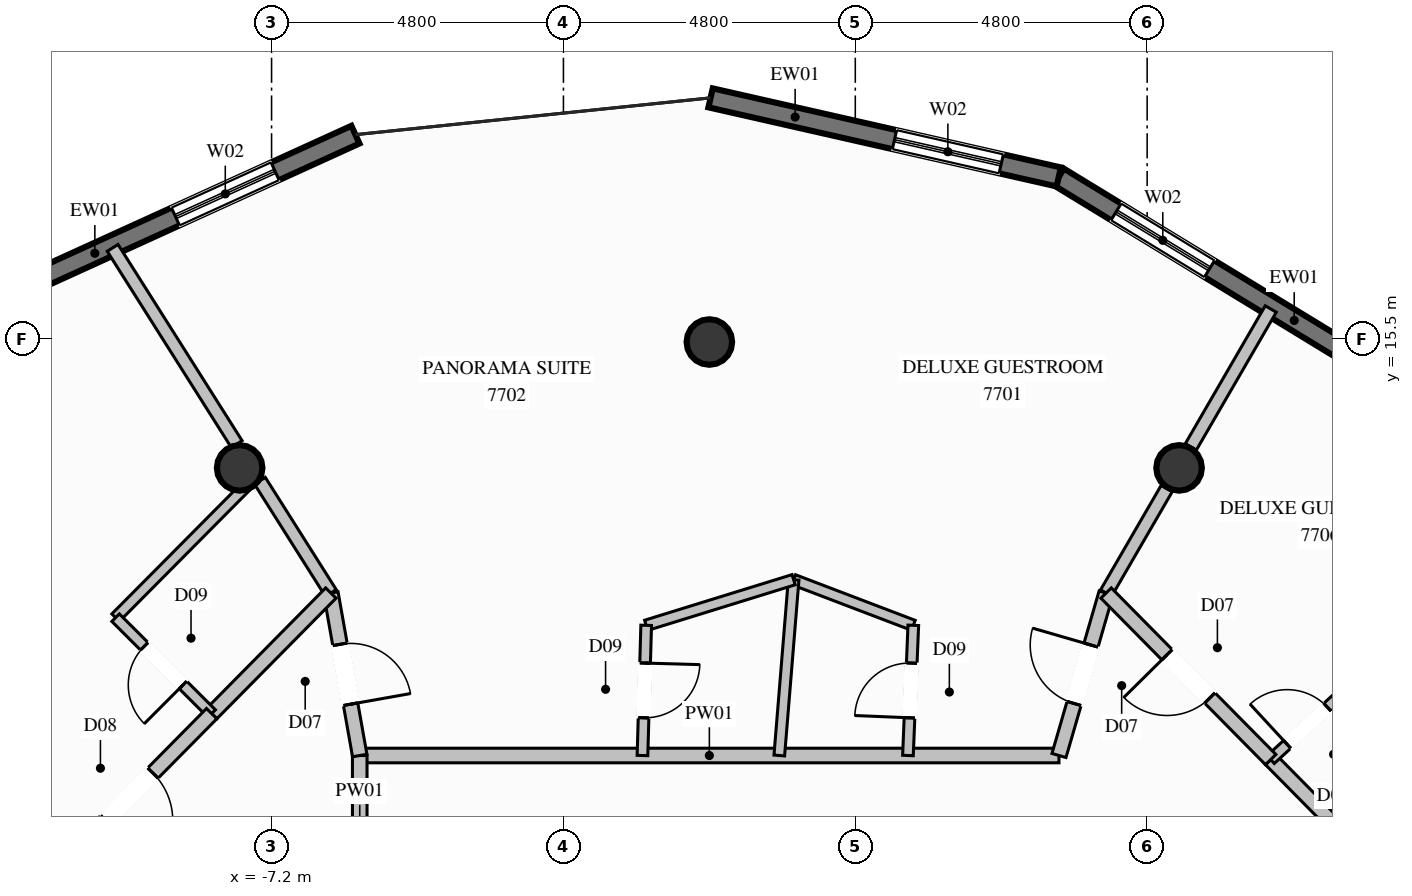
"""IFC4 building model, lengths in metres.
Left out: names, types, materials, properties, quantities, classifications, styles, units other than length and angle.
Written with IfcOpenShell. Run it as: python <this file> out.ifc"""

import sys

from ifc_helpers import new_model, si_unit, direction, frame, frame_2d, origin, origin_2d, place, context, subcontext, project, spatial, rectangle, circle, extrude, element, fill, save


model = new_model("IFC4")
c1 = context("Model", 3, precision=1e-05, world=origin(), true_north=direction((0.0, 1.0)))
c2 = subcontext(c1, "Body", "Model", "MODEL_VIEW")
j1 = project(units=[si_unit("LENGTHUNIT", "METRE"), si_unit("PLANEANGLEUNIT", "RADIAN")], contexts=[c1])
p1 = place(None, origin())
s1 = spatial("IfcSite", under=j1, at=p1, CompositionType="ELEMENT")
p2 = place(p1, origin())
s2 = spatial("IfcBuilding", under=s1, at=p2, CompositionType="ELEMENT")
p3 = place(p2, frame((0.0, 0.0, 289.6)))
s3 = spatial("IfcBuildingStorey", under=s2, at=p3, CompositionType="ELEMENT", Elevation=289.6)
for number, where, z_axis, x_axis in (
    (1, (7.725, 13.38, 0.0), (0.0, 0.0, 1.0), (1.0, 0.0, 0.0)),
    (2, (0.0, 15.45, 0.0), (0.0, 0.0, 1.0), (1.0, 0.0, 0.0)),
    (3, (-7.725, 13.38, 0.0), (0.0, 0.0, 1.0), (1.0, 0.0, 0.0)),
):
    element("IfcColumn", number, at=place(p3, frame(where, z_axis=z_axis, x_axis=x_axis)), inside=s3, PredefinedType="COLUMN", context=c2, shape_type="SweptSolid", body=[
        extrude(circle(Radius=0.375, at=origin_2d()), origin(), (0.0, 0.0, 1.0), 3.8),
    ])
p4 = place(p3, frame((5.746, 18.165, 0.0), z_axis=(0.0, 0.0, 1.0), x_axis=(0.853900395315, -0.520436465748, 0.0)))
e4 = element("IfcWall", 4, at=p4, inside=s3, PredefinedType="SOLIDWALL", context=c2, shape_type="SweptSolid", body=[
    extrude(rectangle(XDim=5.917, YDim=0.32, at=frame_2d((2.958, 0.0))), origin(), (0.0, 0.0, 1.0), 3.57),
])
p5 = place(p4, frame((1.104, 0.0, 0.35)))
e5 = element("IfcOpeningElement", 5, at=p5, cuts=e4, PredefinedType="OPENING", context=c2, shape_type="SweptSolid", body=[
    extrude(rectangle(XDim=1.8, YDim=2.6, at=frame_2d((0.9, 1.3))), frame((0.0, 0.17, 0.0), z_axis=(0.0, -1.0, 0.0), x_axis=(1.0, 0.0, 0.0)), (0.0, 0.0, 1.0), 0.34),
])
p6 = place(p3, frame((0.02, 19.465, 0.0), z_axis=(0.0, 0.0, 1.0), x_axis=(0.975181843915, -0.221405445504, 0.0)))
e6 = element("IfcWall", 6, at=p6, inside=s3, PredefinedType="SOLIDWALL", context=c2, shape_type="SweptSolid", body=[
    extrude(rectangle(XDim=5.872, YDim=0.32, at=frame_2d((2.936, 0.0))), origin(), (0.0, 0.0, 1.0), 3.57),
])
p7 = place(p6, frame((3.102, 0.0, 0.35)))
e7 = element("IfcOpeningElement", 7, at=p7, cuts=e6, PredefinedType="OPENING", context=c2, shape_type="SweptSolid", body=[
    extrude(rectangle(XDim=1.8, YDim=2.6, at=frame_2d((0.9, 1.3))), frame((0.0, 0.17, 0.0), z_axis=(0.0, -1.0, 0.0), x_axis=(1.0, 0.0, 0.0)), (0.0, 0.0, 1.0), 0.34),
])
p8 = place(p3, frame((-11.205, 16.409, 0.0), z_axis=(0.0, 0.0, 1.0), x_axis=(0.910118979779, 0.414347007526, 0.0)))
e8 = element("IfcWall", 8, at=p8, inside=s3, PredefinedType="SOLIDWALL", context=c2, shape_type="SweptSolid", body=[
    extrude(rectangle(XDim=5.916, YDim=0.32, at=frame_2d((2.958, 0.0))), origin(), (0.0, 0.0, 1.0), 3.57),
])
p9 = place(p8, frame((2.664, 0.0, 0.35)))
e9 = element("IfcOpeningElement", 9, at=p9, cuts=e8, PredefinedType="OPENING", context=c2, shape_type="SweptSolid", body=[
    extrude(rectangle(XDim=1.8, YDim=2.6, at=frame_2d((0.9, 1.3))), frame((0.0, 0.17, 0.0), z_axis=(0.0, -1.0, 0.0), x_axis=(1.0, 0.0, 0.0)), (0.0, 0.0, 1.0), 0.34),
])
p10 = place(p3, frame((-5.75, 8.65, 0.0), z_axis=(0.0, 0.0, 1.0), x_axis=(1.0, 0.0, 0.0)))
e10 = element("IfcWall", 10, at=p10, inside=s3, PredefinedType="PARTITIONING", context=c2, shape_type="SweptSolid", body=[
    extrude(rectangle(XDim=11.5, YDim=0.24, at=frame_2d((5.75, 0.0))), origin(), (0.0, 0.0, 1.0), 3.57),
])
p11 = place(p3, frame((-5.75, 6.1, 0.0), z_axis=(0.0, 0.0, 1.0), x_axis=(0.0, 1.0, 0.0)))
e11 = element("IfcWall", 11, at=p11, inside=s3, PredefinedType="PARTITIONING", context=c2, shape_type="SweptSolid", body=[
    extrude(rectangle(XDim=2.55, YDim=0.24, at=frame_2d((1.275, 0.0))), origin(), (0.0, 0.0, 1.0), 3.57),
])
p12 = place(p3, frame((6.525, 11.322, 0.0), z_axis=(0.0, 0.0, 1.0), x_axis=(0.501738314133, 0.865019458817, 0.0)))
e12 = element("IfcWall", 12, at=p12, inside=s3, PredefinedType="PARTITIONING", context=c2, shape_type="SweptSolid", body=[
    extrude(rectangle(XDim=1.987, YDim=0.21, at=frame_2d((0.994, 0.0))), origin(), (0.0, 0.0, 1.0), 3.085),
])
p13 = place(p3, frame((7.918, 13.725, 0.0), z_axis=(0.0, 0.0, 1.0), x_axis=(0.501605190626, 0.865096660921, 0.0)))
e13 = element("IfcWall", 13, at=p13, inside=s3, PredefinedType="PARTITIONING", context=c2, shape_type="SweptSolid", body=[
    extrude(rectangle(XDim=2.622, YDim=0.21, at=frame_2d((1.311, 0.0))), origin(), (0.0, 0.0, 1.0), 3.57),
])
p14 = place(p3, frame((-6.225, 11.322, 0.0), z_axis=(0.0, 0.0, 1.0), x_axis=(-0.534363069493, 0.845255056159, 0.0)))
e14 = element("IfcWall", 14, at=p14, inside=s3, PredefinedType="PARTITIONING", context=c2, shape_type="SweptSolid", body=[
    extrude(rectangle(XDim=2.184, YDim=0.21, at=frame_2d((1.092, 0.0))), origin(), (0.0, 0.0, 1.0), 3.085),
])
p15 = place(p3, frame((-7.774, 13.772, 0.0), z_axis=(0.0, 0.0, 1.0), x_axis=(-0.534464578877, 0.845190874256, 0.0)))
e15 = element("IfcWall", 15, at=p15, inside=s3, PredefinedType="PARTITIONING", context=c2, shape_type="SweptSolid", body=[
    extrude(rectangle(XDim=3.817, YDim=0.21, at=frame_2d((1.908, 0.0))), origin(), (0.0, 0.0, 1.0), 3.57),
])
p16 = place(p3, frame((1.386, 11.541, 0.0), z_axis=(0.0, 0.0, 1.0), x_axis=(0.934443654622, -0.356111016871, 0.0)))
e16 = element("IfcWall", 16, at=p16, inside=s3, PredefinedType="PLUMBINGWALL", context=c2, shape_type="SweptSolid", body=[
    extrude(rectangle(XDim=2.106, YDim=0.175, at=frame_2d((1.053, 0.0))), origin(), (0.0, 0.0, 1.0), 3.253),
])
p17 = place(p3, frame((1.386, 11.541, 0.0), z_axis=(0.0, 0.0, 1.0), x_axis=(-0.081387603682, -0.996682526167, 0.0)))
e17 = element("IfcWall", 17, at=p17, inside=s3, PredefinedType="PLUMBINGWALL", context=c2, shape_type="SweptSolid", body=[
    extrude(rectangle(XDim=2.901, YDim=0.175, at=frame_2d((1.45, 0.0))), origin(), (0.0, 0.0, 1.0), 3.57),
])
p18 = place(p3, frame((3.266, 8.65, 0.0), z_axis=(0.0, 0.0, 1.0), x_axis=(0.041014490153, 0.999158551781, 0.0)))
e18 = element("IfcWall", 18, at=p18, inside=s3, PredefinedType="PLUMBINGWALL", context=c2, shape_type="SweptSolid", body=[
    extrude(rectangle(XDim=2.143, YDim=0.175, at=frame_2d((1.071, 0.0))), origin(), (0.0, 0.0, 1.0), 3.57),
])
p19 = place(p18, frame((0.621, 0.0, 0.0)))
e19 = element("IfcOpeningElement", 19, at=p19, cuts=e18, PredefinedType="OPENING", context=c2, shape_type="SweptSolid", body=[
    extrude(rectangle(XDim=0.9, YDim=2.1, at=frame_2d((0.45, 1.05))), frame((0.0, 0.098, 0.0), z_axis=(0.0, -1.0, 0.0), x_axis=(1.0, 0.0, 0.0)), (0.0, 0.0, 1.0), 0.195),
])
p20 = place(p3, frame((5.75, 8.65, 0.0), z_axis=(0.0, 0.0, 1.0), x_axis=(0.27852040308, 0.960430312448, 0.0)))
e20 = element("IfcWall", 20, at=p20, inside=s3, PredefinedType="PARTITIONING", context=c2, shape_type="SweptSolid", body=[
    extrude(rectangle(XDim=2.782, YDim=0.24, at=frame_2d((1.391, 0.0))), origin(), (0.0, 0.0, 1.0), 3.57),
])
p21 = place(p20, frame((0.891, 0.0, 0.0)))
e21 = element("IfcOpeningElement", 21, at=p21, cuts=e20, PredefinedType="OPENING", context=c2, shape_type="SweptSolid", body=[
    extrude(rectangle(XDim=1.0, YDim=2.2, at=frame_2d((0.5, 1.1))), frame((0.0, 0.13, 0.0), z_axis=(0.0, -1.0, 0.0), x_axis=(1.0, 0.0, 0.0)), (0.0, 0.0, 1.0), 0.26),
])
p22 = place(p3, frame((-1.039, 10.791, 0.0), z_axis=(0.0, 0.0, 1.0), x_axis=(0.955353783444, 0.295464293037, 0.0)))
e22 = element("IfcWall", 22, at=p22, inside=s3, PredefinedType="PLUMBINGWALL", context=c2, shape_type="SweptSolid", body=[
    extrude(rectangle(XDim=2.538, YDim=0.175, at=frame_2d((1.269, 0.0))), origin(), (0.0, 0.0, 1.0), 3.253),
])
p23 = place(p3, frame((-1.039, 10.791, 0.0), z_axis=(0.0, 0.0, 1.0), x_axis=(-0.028494696229, -0.999593943703, 0.0)))
e23 = element("IfcWall", 23, at=p23, inside=s3, PredefinedType="PLUMBINGWALL", context=c2, shape_type="SweptSolid", body=[
    extrude(rectangle(XDim=2.142, YDim=0.175, at=frame_2d((1.071, 0.0))), origin(), (0.0, 0.0, 1.0), 3.57),
])
p24 = place(p23, frame((0.621, 0.0, 0.0)))
e24 = element("IfcOpeningElement", 24, at=p24, cuts=e23, PredefinedType="OPENING", context=c2, shape_type="SweptSolid", body=[
    extrude(rectangle(XDim=0.9, YDim=2.1, at=frame_2d((0.45, 1.05))), frame((0.0, 0.098, 0.0), z_axis=(0.0, -1.0, 0.0), x_axis=(1.0, 0.0, 0.0)), (0.0, 0.0, 1.0), 0.195),
])
p25 = place(p3, frame((-6.225, 11.322, 0.0), z_axis=(0.0, 0.0, 1.0), x_axis=(0.175052712288, -0.984559062688, 0.0)))
e25 = element("IfcWall", 25, at=p25, inside=s3, PredefinedType="PARTITIONING", context=c2, shape_type="SweptSolid", body=[
    extrude(rectangle(XDim=2.714, YDim=0.24, at=frame_2d((1.357, 0.0))), origin(), (0.0, 0.0, 1.0), 3.57),
])
p26 = place(p25, frame((0.857, 0.0, 0.0)))
e26 = element("IfcOpeningElement", 26, at=p26, cuts=e25, PredefinedType="OPENING", context=c2, shape_type="SweptSolid", body=[
    extrude(rectangle(XDim=1.0, YDim=2.2, at=frame_2d((0.5, 1.1))), frame((0.0, 0.13, 0.0), z_axis=(0.0, -1.0, 0.0), x_axis=(1.0, 0.0, 0.0)), (0.0, 0.0, 1.0), 0.26),
])
p27 = place(p3, frame((-6.225, 11.322, 0.0), z_axis=(0.0, 0.0, 1.0), x_axis=(-0.702979205765, -0.711210402245, 0.0)))
e27 = element("IfcWall", 27, at=p27, inside=s3, PredefinedType="PARTITIONING", context=c2, shape_type="SweptSolid", body=[
    extrude(rectangle(XDim=2.788, YDim=0.24, at=frame_2d((1.394, 0.0))), origin(), (0.0, 0.0, 1.0), 3.57),
])
p28 = place(p3, frame((-7.445, 13.252, 0.0), z_axis=(0.0, 0.0, 1.0), x_axis=(-0.704803641047, -0.709402444009, 0.0)))
e28 = element("IfcWall", 28, at=p28, inside=s3, PredefinedType="PLUMBINGWALL", context=c2, shape_type="SweptSolid", body=[
    extrude(rectangle(XDim=3.292, YDim=0.175, at=frame_2d((1.646, 0.0))), origin(), (0.0, 0.0, 1.0), 3.138),
])
p29 = place(p3, frame((-8.185, 9.339, 0.0), z_axis=(0.0, 0.0, 1.0), x_axis=(-0.707544008936, 0.706669282917, 0.0)))
e29 = element("IfcWall", 29, at=p29, inside=s3, PredefinedType="PLUMBINGWALL", context=c2, shape_type="SweptSolid", body=[
    extrude(rectangle(XDim=2.233, YDim=0.175, at=frame_2d((1.116, 0.0))), origin(), (0.0, 0.0, 1.0), 3.57),
])
p30 = place(p29, frame((0.667, 0.0, 0.0)))
e30 = element("IfcOpeningElement", 30, at=p30, cuts=e29, PredefinedType="OPENING", context=c2, shape_type="SweptSolid", body=[
    extrude(rectangle(XDim=0.9, YDim=2.1, at=frame_2d((0.45, 1.05))), frame((0.0, 0.098, 0.0), z_axis=(0.0, -1.0, 0.0), x_axis=(1.0, 0.0, 0.0)), (0.0, 0.0, 1.0), 0.195),
])
p31 = place(p3, frame((-8.185, 9.339, 0.0), z_axis=(0.0, 0.0, 1.0), x_axis=(-0.702942107486, -0.711247069254, 0.0)))
e31 = element("IfcWall", 31, at=p31, inside=s3, PredefinedType="PARTITIONING", context=c2, shape_type="SweptSolid", body=[
    extrude(rectangle(XDim=3.851, YDim=0.24, at=frame_2d((1.926, 0.0))), origin(), (0.0, 0.0, 1.0), 3.57),
])
p32 = place(p31, frame((1.375, 0.0, 0.0)))
e32 = element("IfcOpeningElement", 32, at=p32, cuts=e31, PredefinedType="OPENING", context=c2, shape_type="SweptSolid", body=[
    extrude(rectangle(XDim=1.1, YDim=2.3, at=frame_2d((0.55, 1.15))), frame((0.0, 0.13, 0.0), z_axis=(0.0, -1.0, 0.0), x_axis=(1.0, 0.0, 0.0)), (0.0, 0.0, 1.0), 0.26),
])
p33 = place(p3, frame((11.192, 6.6, 0.0), z_axis=(0.0, 0.0, 1.0), x_axis=(-0.702979205765, 0.711210402245, 0.0)))
e33 = element("IfcWall", 33, at=p33, inside=s3, PredefinedType="PARTITIONING", context=c2, shape_type="SweptSolid", body=[
    extrude(rectangle(XDim=2.788, YDim=0.24, at=frame_2d((1.394, 0.0))), origin(), (0.0, 0.0, 1.0), 3.57),
])
p34 = place(p3, frame((9.232, 8.583, 0.0), z_axis=(0.0, 0.0, 1.0), x_axis=(0.734923403839, 0.678150123859, 0.0)))
e34 = element("IfcWall", 34, at=p34, inside=s3, PredefinedType="PLUMBINGWALL", context=c2, shape_type="SweptSolid", body=[
    extrude(rectangle(XDim=1.638, YDim=0.175, at=frame_2d((0.819, 0.0))), origin(), (0.0, 0.0, 1.0), 3.57),
])
p35 = place(p34, frame((0.369, 0.0, 0.0)))
e35 = element("IfcOpeningElement", 35, at=p35, cuts=e34, PredefinedType="OPENING", context=c2, shape_type="SweptSolid", body=[
    extrude(rectangle(XDim=0.9, YDim=2.1, at=frame_2d((0.45, 1.05))), frame((0.0, 0.098, 0.0), z_axis=(0.0, -1.0, 0.0), x_axis=(1.0, 0.0, 0.0)), (0.0, 0.0, 1.0), 0.195),
])
p36 = place(p3, frame((9.232, 8.583, 0.0), z_axis=(0.0, 0.0, 1.0), x_axis=(-0.702942107486, 0.711247069254, 0.0)))
e36 = element("IfcWall", 36, at=p36, inside=s3, PredefinedType="PARTITIONING", context=c2, shape_type="SweptSolid", body=[
    extrude(rectangle(XDim=3.851, YDim=0.24, at=frame_2d((1.926, 0.0))), origin(), (0.0, 0.0, 1.0), 3.57),
])
p37 = place(p36, frame((1.425, 0.0, 0.0)))
e37 = element("IfcOpeningElement", 37, at=p37, cuts=e36, PredefinedType="OPENING", context=c2, shape_type="SweptSolid", body=[
    extrude(rectangle(XDim=1.0, YDim=2.2, at=frame_2d((0.5, 1.1))), frame((0.0, 0.13, 0.0), z_axis=(0.0, -1.0, 0.0), x_axis=(1.0, 0.0, 0.0)), (0.0, 0.0, 1.0), 0.26),
])
p38 = place(p5, origin())
e38 = element("IfcWindow", 38, at=p38, inside=s3, PartitioningType="SINGLE_PANEL", PredefinedType="WINDOW", context=c2, shape_type="SweptSolid", body=[
    extrude(rectangle(XDim=1.8, YDim=2.6, at=frame_2d((0.9, 1.3))), frame((0.0, 0.03, 0.0), z_axis=(0.0, -1.0, 0.0), x_axis=(1.0, 0.0, 0.0)), (0.0, 0.0, 1.0), 0.06),
])
fill(e5, e38)
p39 = place(p7, origin())
e39 = element("IfcWindow", 39, at=p39, inside=s3, PartitioningType="SINGLE_PANEL", PredefinedType="WINDOW", context=c2, shape_type="SweptSolid", body=[
    extrude(rectangle(XDim=1.8, YDim=2.6, at=frame_2d((0.9, 1.3))), frame((0.0, 0.03, 0.0), z_axis=(0.0, -1.0, 0.0), x_axis=(1.0, 0.0, 0.0)), (0.0, 0.0, 1.0), 0.06),
])
fill(e7, e39)
p40 = place(p9, origin())
e40 = element("IfcWindow", 40, at=p40, inside=s3, PartitioningType="SINGLE_PANEL", PredefinedType="WINDOW", context=c2, shape_type="SweptSolid", body=[
    extrude(rectangle(XDim=1.8, YDim=2.6, at=frame_2d((0.9, 1.3))), frame((0.0, 0.03, 0.0), z_axis=(0.0, -1.0, 0.0), x_axis=(1.0, 0.0, 0.0)), (0.0, 0.0, 1.0), 0.06),
])
fill(e9, e40)
p41 = place(p19, origin())
e41 = element("IfcDoor", 41, at=p41, inside=s3, OperationType="SINGLE_SWING_LEFT", PredefinedType="DOOR", context=c2, shape_type="SweptSolid", body=[
    extrude(rectangle(XDim=0.9, YDim=2.1, at=frame_2d((0.45, 1.05))), frame((0.0, 0.025, 0.0), z_axis=(0.0, -1.0, 0.0), x_axis=(1.0, 0.0, 0.0)), (0.0, 0.0, 1.0), 0.05),
])
fill(e19, e41)
p42 = place(p21, origin())
e42 = element("IfcDoor", 42, at=p42, inside=s3, OperationType="SINGLE_SWING_RIGHT", PredefinedType="DOOR", context=c2, shape_type="SweptSolid", body=[
    extrude(rectangle(XDim=1.0, YDim=2.2, at=frame_2d((0.5, 1.1))), frame((0.0, 0.025, 0.0), z_axis=(0.0, -1.0, 0.0), x_axis=(1.0, 0.0, 0.0)), (0.0, 0.0, 1.0), 0.05),
])
fill(e21, e42)
p43 = place(p24, origin())
e43 = element("IfcDoor", 43, at=p43, inside=s3, OperationType="SINGLE_SWING_LEFT", PredefinedType="DOOR", context=c2, shape_type="SweptSolid", body=[
    extrude(rectangle(XDim=0.9, YDim=2.1, at=frame_2d((0.45, 1.05))), frame((0.0, 0.025, 0.0), z_axis=(0.0, -1.0, 0.0), x_axis=(1.0, 0.0, 0.0)), (0.0, 0.0, 1.0), 0.05),
])
fill(e24, e43)
p44 = place(p26, origin())
e44 = element("IfcDoor", 44, at=p44, inside=s3, OperationType="SINGLE_SWING_RIGHT", PredefinedType="DOOR", context=c2, shape_type="SweptSolid", body=[
    extrude(rectangle(XDim=1.0, YDim=2.2, at=frame_2d((0.5, 1.1))), frame((0.0, 0.025, 0.0), z_axis=(0.0, -1.0, 0.0), x_axis=(1.0, 0.0, 0.0)), (0.0, 0.0, 1.0), 0.05),
])
fill(e26, e44)
p45 = place(p30, origin())
e45 = element("IfcDoor", 45, at=p45, inside=s3, OperationType="SINGLE_SWING_LEFT", PredefinedType="DOOR", context=c2, shape_type="SweptSolid", body=[
    extrude(rectangle(XDim=0.9, YDim=2.1, at=frame_2d((0.45, 1.05))), frame((0.0, 0.025, 0.0), z_axis=(0.0, -1.0, 0.0), x_axis=(1.0, 0.0, 0.0)), (0.0, 0.0, 1.0), 0.05),
])
fill(e30, e45)
p46 = place(p32, origin())
e46 = element("IfcDoor", 46, at=p46, inside=s3, OperationType="SINGLE_SWING_RIGHT", PredefinedType="DOOR", context=c2, shape_type="SweptSolid", body=[
    extrude(rectangle(XDim=1.1, YDim=2.3, at=frame_2d((0.55, 1.15))), frame((0.0, 0.025, 0.0), z_axis=(0.0, -1.0, 0.0), x_axis=(1.0, 0.0, 0.0)), (0.0, 0.0, 1.0), 0.05),
])
fill(e32, e46)
p47 = place(p35, origin())
e47 = element("IfcDoor", 47, at=p47, inside=s3, OperationType="SINGLE_SWING_LEFT", PredefinedType="DOOR", context=c2, shape_type="SweptSolid", body=[
    extrude(rectangle(XDim=0.9, YDim=2.1, at=frame_2d((0.45, 1.05))), frame((0.0, 0.025, 0.0), z_axis=(0.0, -1.0, 0.0), x_axis=(1.0, 0.0, 0.0)), (0.0, 0.0, 1.0), 0.05),
])
fill(e35, e47)
p48 = place(p37, origin())
e48 = element("IfcDoor", 48, at=p48, inside=s3, OperationType="SINGLE_SWING_RIGHT", PredefinedType="DOOR", context=c2, shape_type="SweptSolid", body=[
    extrude(rectangle(XDim=1.0, YDim=2.2, at=frame_2d((0.5, 1.1))), frame((0.0, 0.025, 0.0), z_axis=(0.0, -1.0, 0.0), x_axis=(1.0, 0.0, 0.0)), (0.0, 0.0, 1.0), 0.05),
])
fill(e37, e48)
save(model, sys.argv[1])
